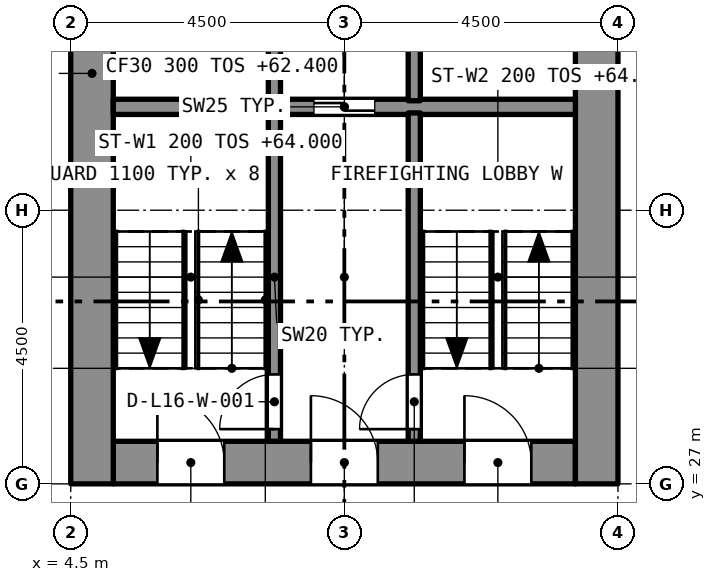
"""IFC4 building model, lengths in metres.
Left out: names, types, materials, properties, quantities, classifications, styles, units other than length and angle.
Written with IfcOpenShell. Run it as: python <this file> out.ifc"""

import sys

from ifc_helpers import new_model, si_unit, direction, frame, frame_2d, origin, place, context, subcontext, project, spatial, rectangle, extrude, element, fill, save


model = new_model("IFC4")
c1 = context("Model", 3, precision=1e-05, world=origin(), true_north=direction((0.0, 1.0)))
c2 = subcontext(c1, "Body", "Model", "MODEL_VIEW")
j1 = project(units=[si_unit("LENGTHUNIT", "METRE"), si_unit("PLANEANGLEUNIT", "RADIAN")], contexts=[c1])
p1 = place(None, origin())
s1 = spatial("IfcSite", under=j1, at=p1, CompositionType="ELEMENT")
p2 = place(p1, origin())
s2 = spatial("IfcBuilding", under=s1, at=p2, CompositionType="ELEMENT")
p3 = place(p2, frame((0.0, 0.0, 62.4)))
s3 = spatial("IfcBuildingStorey", under=s2, at=p3, CompositionType="ELEMENT", Elevation=62.4)
p4 = place(p3, frame((5.2, 27.35, 0.0), z_axis=(0.0, 0.0, 1.0), x_axis=(1.0, 0.0, 0.0)))
e1 = element("IfcWall", 1, at=p4, inside=s3, PredefinedType="SOLIDWALL", context=c2, shape_type="SweptSolid", body=[
    extrude(rectangle(XDim=7.6, YDim=0.7, at=frame_2d((3.8, 0.0))), origin(), (0.0, 0.0, 1.0), 3.2),
])
p5 = place(p4, frame((0.725, 0.0, 0.0)))
e2 = element("IfcOpeningElement", 2, at=p5, cuts=e1, PredefinedType="OPENING", context=c2, shape_type="SweptSolid", body=[
    extrude(rectangle(XDim=1.1, YDim=2.1, at=frame_2d((0.55, 1.05))), frame((0.0, 0.36, 0.0), z_axis=(0.0, -1.0, 0.0), x_axis=(1.0, 0.0, 0.0)), (0.0, 0.0, 1.0), 0.72),
])
p6 = place(p4, frame((3.25, 0.0, 0.0)))
e3 = element("IfcOpeningElement", 3, at=p6, cuts=e1, PredefinedType="OPENING", context=c2, shape_type="SweptSolid", body=[
    extrude(rectangle(XDim=1.1, YDim=2.1, at=frame_2d((0.55, 1.05))), frame((0.0, 0.36, 0.0), z_axis=(0.0, -1.0, 0.0), x_axis=(1.0, 0.0, 0.0)), (0.0, 0.0, 1.0), 0.72),
])
p7 = place(p4, frame((5.775, 0.0, 0.0)))
e4 = element("IfcOpeningElement", 4, at=p7, cuts=e1, PredefinedType="OPENING", context=c2, shape_type="SweptSolid", body=[
    extrude(rectangle(XDim=1.1, YDim=2.1, at=frame_2d((0.55, 1.05))), frame((0.0, 0.36, 0.0), z_axis=(0.0, -1.0, 0.0), x_axis=(1.0, 0.0, 0.0)), (0.0, 0.0, 1.0), 0.72),
])
p8 = place(p3, frame((4.85, 27.0, 0.0), z_axis=(0.0, 0.0, 1.0), x_axis=(0.0, 1.0, 0.0)))
e5 = element("IfcWall", 5, at=p8, inside=s3, PredefinedType="SOLIDWALL", context=c2, shape_type="SweptSolid", body=[
    extrude(rectangle(XDim=13.5, YDim=0.7, at=frame_2d((6.75, 0.0))), origin(), (0.0, 0.0, 1.0), 3.2),
])
p9 = place(p8, frame((8.95, 0.0, 0.0)))
e6 = element("IfcOpeningElement", 6, at=p9, cuts=e5, PredefinedType="OPENING", context=c2, shape_type="SweptSolid", body=[
    extrude(rectangle(XDim=1.2, YDim=2.1, at=frame_2d((0.6, 1.05))), frame((0.0, 0.36, 0.0), z_axis=(0.0, -1.0, 0.0), x_axis=(1.0, 0.0, 0.0)), (0.0, 0.0, 1.0), 0.72),
])
p10 = place(p3, frame((13.15, 27.0, 0.0), z_axis=(0.0, 0.0, 1.0), x_axis=(0.0, 1.0, 0.0)))
e7 = element("IfcWall", 7, at=p10, inside=s3, PredefinedType="SOLIDWALL", context=c2, shape_type="SweptSolid", body=[
    extrude(rectangle(XDim=13.5, YDim=0.7, at=frame_2d((6.75, 0.0))), origin(), (0.0, 0.0, 1.0), 3.2),
])
p11 = place(p10, frame((11.1, 0.0, 0.0)))
e8 = element("IfcOpeningElement", 8, at=p11, cuts=e7, PredefinedType="OPENING", context=c2, shape_type="SweptSolid", body=[
    extrude(rectangle(XDim=1.1, YDim=2.1, at=frame_2d((0.55, 1.05))), frame((0.0, 0.36, 0.0), z_axis=(0.0, -1.0, 0.0), x_axis=(1.0, 0.0, 0.0)), (0.0, 0.0, 1.0), 0.72),
])
p12 = place(p10, frame((8.95, 0.0, 0.0)))
e9 = element("IfcOpeningElement", 9, at=p12, cuts=e7, PredefinedType="OPENING", context=c2, shape_type="SweptSolid", body=[
    extrude(rectangle(XDim=1.2, YDim=2.1, at=frame_2d((0.6, 1.05))), frame((0.0, 0.36, 0.0), z_axis=(0.0, -1.0, 0.0), x_axis=(1.0, 0.0, 0.0)), (0.0, 0.0, 1.0), 0.72),
])
p13 = place(p3, frame((5.2, 33.2, 0.0), z_axis=(0.0, 0.0, 1.0), x_axis=(1.0, 0.0, 0.0)))
e10 = element("IfcWall", 10, at=p13, inside=s3, PredefinedType="SOLIDWALL", context=c2, shape_type="SweptSolid", body=[
    extrude(rectangle(XDim=7.6, YDim=0.25, at=frame_2d((3.8, 0.0))), origin(), (0.0, 0.0, 1.0), 2.9),
])
p14 = place(p13, frame((3.3, 0.0, 0.0)))
e11 = element("IfcOpeningElement", 11, at=p14, cuts=e10, PredefinedType="OPENING", context=c2, shape_type="SweptSolid", body=[
    extrude(rectangle(XDim=1.0, YDim=2.1, at=frame_2d((0.5, 1.05))), frame((0.0, 0.135, 0.0), z_axis=(0.0, -1.0, 0.0), x_axis=(1.0, 0.0, 0.0)), (0.0, 0.0, 1.0), 0.27),
])
p15 = place(p3, frame((7.85, 27.7, 0.0), z_axis=(0.0, 0.0, 1.0), x_axis=(0.0, 1.0, 0.0)))
e12 = element("IfcWall", 12, at=p15, inside=s3, PredefinedType="SOLIDWALL", context=c2, shape_type="SweptSolid", body=[
    extrude(rectangle(XDim=5.4, YDim=0.2, at=frame_2d((2.7, 0.0))), origin(), (0.0, 0.0, 1.0), 2.9),
])
p16 = place(p15, frame((0.2, 0.0, 0.0)))
e13 = element("IfcOpeningElement", 13, at=p16, cuts=e12, PredefinedType="OPENING", context=c2, shape_type="SweptSolid", body=[
    extrude(rectangle(XDim=0.9, YDim=2.1, at=frame_2d((0.45, 1.05))), frame((0.0, 0.11, 0.0), z_axis=(0.0, -1.0, 0.0), x_axis=(1.0, 0.0, 0.0)), (0.0, 0.0, 1.0), 0.22),
])
p17 = place(p3, frame((10.15, 27.7, 0.0), z_axis=(0.0, 0.0, 1.0), x_axis=(0.0, 1.0, 0.0)))
e14 = element("IfcWall", 14, at=p17, inside=s3, PredefinedType="SOLIDWALL", context=c2, shape_type="SweptSolid", body=[
    extrude(rectangle(XDim=5.4, YDim=0.2, at=frame_2d((2.7, 0.0))), origin(), (0.0, 0.0, 1.0), 2.9),
])
p18 = place(p17, frame((0.2, 0.0, 0.0)))
e15 = element("IfcOpeningElement", 15, at=p18, cuts=e14, PredefinedType="OPENING", context=c2, shape_type="SweptSolid", body=[
    extrude(rectangle(XDim=0.9, YDim=2.1, at=frame_2d((0.45, 1.05))), frame((0.0, 0.11, 0.0), z_axis=(0.0, -1.0, 0.0), x_axis=(1.0, 0.0, 0.0)), (0.0, 0.0, 1.0), 0.22),
])
for number, where, z_axis, x_axis in (
    (16, (7.85, 33.3, 0.0), (0.0, 0.0, 1.0), (0.0, 1.0, 0.0)),
    (17, (10.15, 33.3, 0.0), (0.0, 0.0, 1.0), (0.0, 1.0, 0.0)),
):
    element("IfcWall", number, at=place(p3, frame(where, z_axis=z_axis, x_axis=x_axis)), inside=s3, PredefinedType="SOLIDWALL", context=c2, shape_type="SweptSolid", body=[
        extrude(rectangle(XDim=2.3, YDim=0.2, at=frame_2d((1.15, 0.0))), origin(), (0.0, 0.0, 1.0), 2.9),
    ])
p19 = place(p16, origin())
e18 = element("IfcDoor", 18, at=p19, inside=s3, OperationType="SINGLE_SWING_LEFT", PredefinedType="DOOR", context=c2, shape_type="SweptSolid", body=[
    extrude(rectangle(XDim=0.9, YDim=2.1, at=frame_2d((0.45, 1.05))), frame((0.0, 0.025, 0.0), z_axis=(0.0, -1.0, 0.0), x_axis=(1.0, 0.0, 0.0)), (0.0, 0.0, 1.0), 0.05),
])
fill(e13, e18)
p20 = place(p18, origin())
e19 = element("IfcDoor", 19, at=p20, inside=s3, OperationType="SINGLE_SWING_LEFT", PredefinedType="DOOR", context=c2, shape_type="SweptSolid", body=[
    extrude(rectangle(XDim=0.9, YDim=2.1, at=frame_2d((0.45, 1.05))), frame((0.0, 0.025, 0.0), z_axis=(0.0, -1.0, 0.0), x_axis=(1.0, 0.0, 0.0)), (0.0, 0.0, 1.0), 0.05),
])
fill(e15, e19)
p21 = place(p14, origin())
e20 = element("IfcDoor", 20, at=p21, inside=s3, OperationType="SLIDING_TO_LEFT", PredefinedType="DOOR", context=c2, shape_type="SweptSolid", body=[
    extrude(rectangle(XDim=1.0, YDim=2.1, at=frame_2d((0.5, 1.05))), frame((0.0, 0.025, 0.0), z_axis=(0.0, -1.0, 0.0), x_axis=(1.0, 0.0, 0.0)), (0.0, 0.0, 1.0), 0.05),
])
fill(e11, e20)
p22 = place(p5, origin())
e21 = element("IfcDoor", 21, at=p22, inside=s3, OperationType="SINGLE_SWING_LEFT", PredefinedType="DOOR", context=c2, shape_type="SweptSolid", body=[
    extrude(rectangle(XDim=1.1, YDim=2.1, at=frame_2d((0.55, 1.05))), frame((0.0, 0.025, 0.0), z_axis=(0.0, -1.0, 0.0), x_axis=(1.0, 0.0, 0.0)), (0.0, 0.0, 1.0), 0.05),
])
fill(e2, e21)
p23 = place(p6, origin())
e22 = element("IfcDoor", 22, at=p23, inside=s3, OperationType="SINGLE_SWING_LEFT", PredefinedType="DOOR", context=c2, shape_type="SweptSolid", body=[
    extrude(rectangle(XDim=1.1, YDim=2.1, at=frame_2d((0.55, 1.05))), frame((0.0, 0.025, 0.0), z_axis=(0.0, -1.0, 0.0), x_axis=(1.0, 0.0, 0.0)), (0.0, 0.0, 1.0), 0.05),
])
fill(e3, e22)
p24 = place(p7, origin())
e23 = element("IfcDoor", 23, at=p24, inside=s3, OperationType="SINGLE_SWING_LEFT", PredefinedType="DOOR", context=c2, shape_type="SweptSolid", body=[
    extrude(rectangle(XDim=1.1, YDim=2.1, at=frame_2d((0.55, 1.05))), frame((0.0, 0.025, 0.0), z_axis=(0.0, -1.0, 0.0), x_axis=(1.0, 0.0, 0.0)), (0.0, 0.0, 1.0), 0.05),
])
fill(e4, e23)
save(model, sys.argv[1])
